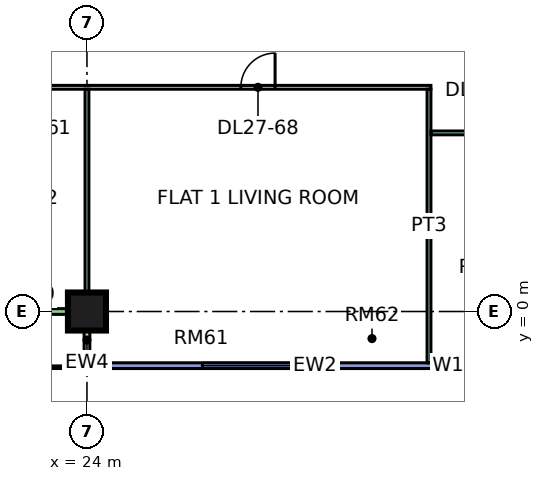
"""IFC4 building model, lengths in metres.
Left out: names, types, materials, properties, quantities, classifications, styles, units other than length and angle.
Written with IfcOpenShell. Run it as: python <this file> out.ifc"""

import sys

from ifc_helpers import new_model, si_unit, direction, frame, frame_2d, origin, origin_2d, place, context, subcontext, project, spatial, rectangle, extrude, element, fill, save


model = new_model("IFC4")
c1 = context("Model", 3, precision=1e-05, world=origin(), true_north=direction((0.0, 1.0)))
c2 = subcontext(c1, "Body", "Model", "MODEL_VIEW")
j1 = project(units=[si_unit("LENGTHUNIT", "METRE"), si_unit("PLANEANGLEUNIT", "RADIAN")], contexts=[c1])
p1 = place(None, origin())
s1 = spatial("IfcSite", under=j1, at=p1, CompositionType="ELEMENT")
p2 = place(p1, origin())
s2 = spatial("IfcBuilding", under=s1, at=p2, CompositionType="ELEMENT")
p3 = place(p2, frame((0.0, 0.0, 118.15)))
s3 = spatial("IfcBuildingStorey", under=s2, at=p3, CompositionType="ELEMENT", Elevation=118.15)
p4 = place(p3, frame((24.0, 0.0, 0.0), z_axis=(0.0, 0.0, 1.0), x_axis=(1.0, 0.0, 0.0)))
e1 = element("IfcColumn", 1, at=p4, inside=s3, PredefinedType="COLUMN", context=c2, shape_type="SweptSolid", body=[
    extrude(rectangle(XDim=1.0, YDim=1.0, at=origin_2d()), origin(), (0.0, 0.0, 1.0), 3.75),
])
p5 = place(p3, frame((12.575, 0.0, 0.0), z_axis=(0.0, 0.0, 1.0), x_axis=(1.0, 0.0, 0.0)))
e2 = element("IfcWall", 2, at=p5, inside=s3, PredefinedType="SOLIDWALL", context=c2, shape_type="SweptSolid", body=[
    extrude(rectangle(XDim=11.35, YDim=0.15, at=frame_2d((5.675, 0.0))), origin(), (0.0, 0.0, 1.0), 3.35),
])
p6 = place(p5, frame((0.613, 0.0, 0.0)))
e3 = element("IfcOpeningElement", 3, at=p6, cuts=e2, PredefinedType="OPENING", context=c2, shape_type="SweptSolid", body=[
    extrude(rectangle(XDim=1.2, YDim=2.4, at=frame_2d((0.6, 1.2))), frame((0.0, 0.085, 0.0), z_axis=(0.0, -1.0, 0.0), x_axis=(1.0, 0.0, 0.0)), (0.0, 0.0, 1.0), 0.17),
])
p7 = place(p5, frame((3.025, 0.0, 0.45)))
e4 = element("IfcOpeningElement", 4, at=p7, cuts=e2, PredefinedType="OPENING", context=c2, shape_type="SweptSolid", body=[
    extrude(rectangle(XDim=1.8, YDim=2.4, at=frame_2d((0.9, 1.2))), frame((0.0, 0.085, 0.0), z_axis=(0.0, -1.0, 0.0), x_axis=(1.0, 0.0, 0.0)), (0.0, 0.0, 1.0), 0.17),
])
p8 = place(p5, frame((6.025, 0.0, 0.45)))
e5 = element("IfcOpeningElement", 5, at=p8, cuts=e2, PredefinedType="OPENING", context=c2, shape_type="SweptSolid", body=[
    extrude(rectangle(XDim=1.8, YDim=2.4, at=frame_2d((0.9, 1.2))), frame((0.0, 0.085, 0.0), z_axis=(0.0, -1.0, 0.0), x_axis=(1.0, 0.0, 0.0)), (0.0, 0.0, 1.0), 0.17),
])
p9 = place(p5, frame((9.025, 0.0, 0.45)))
e6 = element("IfcOpeningElement", 6, at=p9, cuts=e2, PredefinedType="OPENING", context=c2, shape_type="SweptSolid", body=[
    extrude(rectangle(XDim=1.2, YDim=2.4, at=frame_2d((0.6, 1.2))), frame((0.0, 0.085, 0.0), z_axis=(0.0, -1.0, 0.0), x_axis=(1.0, 0.0, 0.0)), (0.0, 0.0, 1.0), 0.17),
])
p10 = place(p3, frame((24.0, -1.5, 0.0), z_axis=(0.0, 0.0, 1.0), x_axis=(0.0, 1.0, 0.0)))
e7 = element("IfcWall", 7, at=p10, inside=s3, PredefinedType="SOLIDWALL", context=c2, shape_type="SweptSolid", body=[
    extrude(rectangle(XDim=1.5, YDim=0.15, at=frame_2d((0.75, 0.0))), origin(), (0.0, 0.0, 1.0), 3.35),
])
p11 = place(p3, frame((24.075, -1.425, 0.0), z_axis=(0.0, 0.0, 1.0), x_axis=(1.0, 0.0, 0.0)))
e8 = element("IfcWall", 8, at=p11, inside=s3, PredefinedType="SOLIDWALL", context=c2, shape_type="SweptSolid", body=[
    extrude(rectangle(XDim=11.85, YDim=0.15, at=frame_2d((5.925, 0.0))), origin(), (0.0, 0.0, 1.0), 3.35),
])
p12 = place(p11, frame((2.962, 0.0, 0.45)))
e9 = element("IfcOpeningElement", 9, at=p12, cuts=e8, PredefinedType="OPENING", context=c2, shape_type="SweptSolid", body=[
    extrude(rectangle(XDim=3.0, YDim=2.4, at=frame_2d((1.5, 1.2))), frame((0.0, 0.085, 0.0), z_axis=(0.0, -1.0, 0.0), x_axis=(1.0, 0.0, 0.0)), (0.0, 0.0, 1.0), 0.17),
])
p13 = place(p11, frame((9.488, 0.0, 0.45)))
e10 = element("IfcOpeningElement", 10, at=p13, cuts=e8, PredefinedType="OPENING", context=c2, shape_type="SweptSolid", body=[
    extrude(rectangle(XDim=1.8, YDim=2.4, at=frame_2d((0.9, 1.2))), frame((0.0, 0.085, 0.0), z_axis=(0.0, -1.0, 0.0), x_axis=(1.0, 0.0, 0.0)), (0.0, 0.0, 1.0), 0.17),
])
p14 = place(p3, frame((11.95, 5.9, 0.0), z_axis=(0.0, 0.0, 1.0), x_axis=(1.0, 0.0, 0.0)))
e11 = element("IfcWall", 11, at=p14, inside=s3, PredefinedType="PARTITIONING", context=c2, shape_type="SweptSolid", body=[
    extrude(rectangle(XDim=21.1, YDim=0.1, at=frame_2d((10.55, 0.0))), origin(), (0.0, 0.0, 1.0), 3.35),
])
p15 = place(p14, frame((1.1, 0.0, 0.0)))
e12 = element("IfcOpeningElement", 12, at=p15, cuts=e11, PredefinedType="OPENING", context=c2, shape_type="SweptSolid", body=[
    extrude(rectangle(XDim=0.9, YDim=2.1, at=frame_2d((0.45, 1.05))), frame((0.0, 0.06, 0.0), z_axis=(0.0, -1.0, 0.0), x_axis=(1.0, 0.0, 0.0)), (0.0, 0.0, 1.0), 0.12),
])
p16 = place(p14, frame((4.1, 0.0, 0.0)))
e13 = element("IfcOpeningElement", 13, at=p16, cuts=e11, PredefinedType="OPENING", context=c2, shape_type="SweptSolid", body=[
    extrude(rectangle(XDim=0.9, YDim=2.1, at=frame_2d((0.45, 1.05))), frame((0.0, 0.06, 0.0), z_axis=(0.0, -1.0, 0.0), x_axis=(1.0, 0.0, 0.0)), (0.0, 0.0, 1.0), 0.12),
])
p17 = place(p14, frame((7.1, 0.0, 0.0)))
e14 = element("IfcOpeningElement", 14, at=p17, cuts=e11, PredefinedType="OPENING", context=c2, shape_type="SweptSolid", body=[
    extrude(rectangle(XDim=0.9, YDim=2.1, at=frame_2d((0.45, 1.05))), frame((0.0, 0.06, 0.0), z_axis=(0.0, -1.0, 0.0), x_axis=(1.0, 0.0, 0.0)), (0.0, 0.0, 1.0), 0.12),
])
p18 = place(p14, frame((10.1, 0.0, 0.0)))
e15 = element("IfcOpeningElement", 15, at=p18, cuts=e11, PredefinedType="OPENING", context=c2, shape_type="SweptSolid", body=[
    extrude(rectangle(XDim=0.9, YDim=2.1, at=frame_2d((0.45, 1.05))), frame((0.0, 0.06, 0.0), z_axis=(0.0, -1.0, 0.0), x_axis=(1.0, 0.0, 0.0)), (0.0, 0.0, 1.0), 0.12),
])
p19 = place(p14, frame((16.1, 0.0, 0.0)))
e16 = element("IfcOpeningElement", 16, at=p19, cuts=e11, PredefinedType="OPENING", context=c2, shape_type="SweptSolid", body=[
    extrude(rectangle(XDim=0.9, YDim=2.1, at=frame_2d((0.45, 1.05))), frame((0.0, 0.06, 0.0), z_axis=(0.0, -1.0, 0.0), x_axis=(1.0, 0.0, 0.0)), (0.0, 0.0, 1.0), 0.12),
])
p20 = place(p3, frame((24.0, 0.0, 0.0), z_axis=(0.0, 0.0, 1.0), x_axis=(0.0, 1.0, 0.0)))
e17 = element("IfcWall", 17, at=p20, inside=s3, PredefinedType="PARTITIONING", context=c2, shape_type="SweptSolid", body=[
    extrude(rectangle(XDim=5.85, YDim=0.1, at=frame_2d((2.925, 0.0))), origin(), (0.0, 0.0, 1.0), 3.35),
])
p21 = place(p3, frame((33.0, -1.35, 0.0), z_axis=(0.0, 0.0, 1.0), x_axis=(0.0, 1.0, 0.0)))
e18 = element("IfcWall", 18, at=p21, inside=s3, PredefinedType="PARTITIONING", context=c2, shape_type="SweptSolid", body=[
    extrude(rectangle(XDim=7.2, YDim=0.1, at=frame_2d((3.6, 0.0))), origin(), (0.0, 0.0, 1.0), 3.35),
])
p22 = place(p3, frame((33.05, 4.7, 0.0), z_axis=(0.0, 0.0, 1.0), x_axis=(1.0, 0.0, 0.0)))
e19 = element("IfcWall", 19, at=p22, inside=s3, PredefinedType="PARTITIONING", context=c2, shape_type="SweptSolid", body=[
    extrude(rectangle(XDim=14.85, YDim=0.1, at=frame_2d((7.425, 0.0))), origin(), (0.0, 0.0, 1.0), 3.35),
])
p23 = place(p22, frame((1.0, 0.0, 0.0)))
e20 = element("IfcOpeningElement", 20, at=p23, cuts=e19, PredefinedType="OPENING", context=c2, shape_type="SweptSolid", body=[
    extrude(rectangle(XDim=0.9, YDim=2.1, at=frame_2d((0.45, 1.05))), frame((0.0, 0.06, 0.0), z_axis=(0.0, -1.0, 0.0), x_axis=(1.0, 0.0, 0.0)), (0.0, 0.0, 1.0), 0.12),
])
p24 = place(p22, frame((13.0, 0.0, 0.0)))
e21 = element("IfcOpeningElement", 21, at=p24, cuts=e19, PredefinedType="OPENING", context=c2, shape_type="SweptSolid", body=[
    extrude(rectangle(XDim=0.9, YDim=2.1, at=frame_2d((0.45, 1.05))), frame((0.0, 0.06, 0.0), z_axis=(0.0, -1.0, 0.0), x_axis=(1.0, 0.0, 0.0)), (0.0, 0.0, 1.0), 0.12),
])
p25 = place(p22, frame((7.0, 0.0, 0.0)))
e22 = element("IfcOpeningElement", 22, at=p25, cuts=e19, PredefinedType="OPENING", context=c2, shape_type="SweptSolid", body=[
    extrude(rectangle(XDim=0.9, YDim=2.1, at=frame_2d((0.45, 1.05))), frame((0.0, 0.06, 0.0), z_axis=(0.0, -1.0, 0.0), x_axis=(1.0, 0.0, 0.0)), (0.0, 0.0, 1.0), 0.12),
])
p26 = place(p12, origin())
e23 = element("IfcWindow", 23, at=p26, inside=s3, PartitioningType="SINGLE_PANEL", PredefinedType="WINDOW", context=c2, shape_type="SweptSolid", body=[
    extrude(rectangle(XDim=3.0, YDim=2.4, at=frame_2d((1.5, 1.2))), frame((0.0, 0.03, 0.0), z_axis=(0.0, -1.0, 0.0), x_axis=(1.0, 0.0, 0.0)), (0.0, 0.0, 1.0), 0.06),
])
fill(e9, e23)
p27 = place(p13, origin())
e24 = element("IfcWindow", 24, at=p27, inside=s3, PartitioningType="SINGLE_PANEL", PredefinedType="WINDOW", context=c2, shape_type="SweptSolid", body=[
    extrude(rectangle(XDim=1.8, YDim=2.4, at=frame_2d((0.9, 1.2))), frame((0.0, 0.03, 0.0), z_axis=(0.0, -1.0, 0.0), x_axis=(1.0, 0.0, 0.0)), (0.0, 0.0, 1.0), 0.06),
])
fill(e10, e24)
p28 = place(p19, frame((0.9, 0.0, 0.0), z_axis=(0.0, 0.0, 1.0), x_axis=(-1.0, 0.0, 0.0)))
e25 = element("IfcDoor", 25, at=p28, inside=s3, OperationType="SINGLE_SWING_RIGHT", PredefinedType="DOOR", context=c2, shape_type="SweptSolid", body=[
    extrude(rectangle(XDim=0.9, YDim=2.1, at=frame_2d((0.45, 1.05))), frame((0.0, 0.025, 0.0), z_axis=(0.0, -1.0, 0.0), x_axis=(1.0, 0.0, 0.0)), (0.0, 0.0, 1.0), 0.05),
])
fill(e16, e25)
save(model, sys.argv[1])
